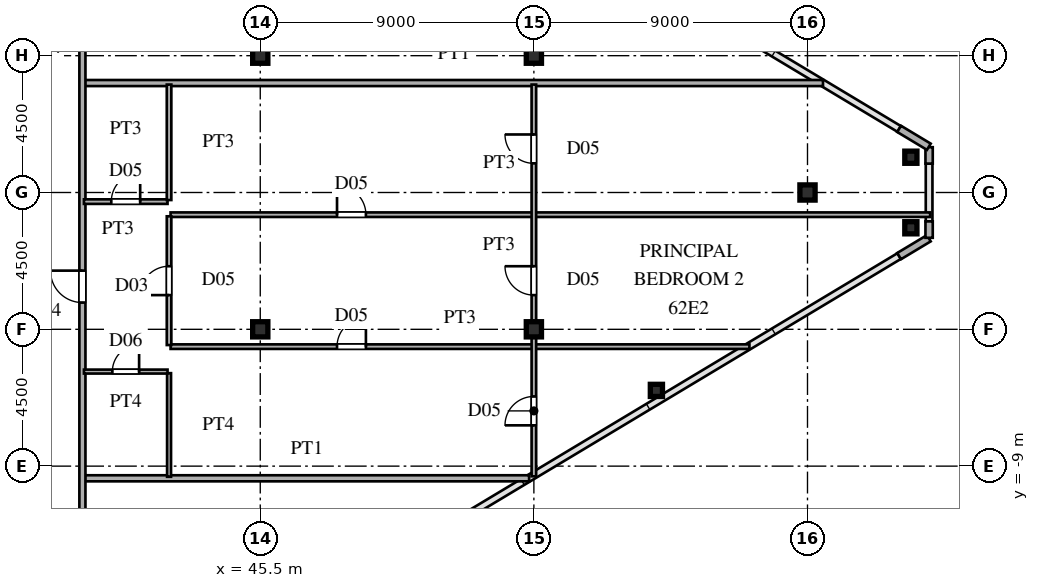
"""IFC4 building model, lengths in metres.
Left out: names, types, materials, properties, quantities, classifications, styles, units other than length and angle.
Written with IfcOpenShell. Run it as: python <this file> out.ifc"""

import sys

from ifc_helpers import new_model, si_unit, direction, frame, frame_2d, origin, origin_2d, place, context, subcontext, project, spatial, rectangle, hollow_rectangle, i_section, extrude, source, transform, mapped, element, fill, save


model = new_model("IFC4")
c1 = context("Model", 3, precision=1e-05, world=origin(), true_north=direction((0.0, 1.0)))
c2 = subcontext(c1, "Body", "Model", "MODEL_VIEW")
j1 = project(units=[si_unit("LENGTHUNIT", "METRE"), si_unit("PLANEANGLEUNIT", "RADIAN")], contexts=[c1])
p1 = place(None, origin())
s1 = spatial("IfcSite", under=j1, at=p1, CompositionType="ELEMENT")
p2 = place(p1, origin())
s2 = spatial("IfcBuilding", under=s1, at=p2, CompositionType="ELEMENT")
p3 = place(p2, frame((0.0, 0.0, 234.6)))
s3 = spatial("IfcBuildingStorey", under=s2, at=p3, CompositionType="ELEMENT", Elevation=234.6)
m1 = source(origin(), c2, "Body", "SweptSolid", [
    extrude(i_section(OverallWidth=0.5, OverallDepth=0.5, WebThickness=0.02, FlangeThickness=0.032, at=origin_2d()), origin(), (0.0, 0.0, 1.0), 4.8),
])
for number, where, z_axis, x_axis in (
    (1, (45.5, -4.5, 0.0), (0.0, 0.0, 1.0), (1.0, 0.0, 0.0)),
    (2, (45.5, 4.5, 0.0), (0.0, 0.0, 1.0), (1.0, 0.0, 0.0)),
    (3, (54.5, -4.5, 0.0), (0.0, 0.0, 1.0), (1.0, 0.0, 0.0)),
    (4, (54.5, 4.5, 0.0), (0.0, 0.0, 1.0), (1.0, 0.0, 0.0)),
    (5, (63.5, 0.0, 0.0), (0.0, 0.0, 1.0), (1.0, 0.0, 0.0)),
):
    element("IfcColumn", number, at=place(p3, frame(where, z_axis=z_axis, x_axis=x_axis)), inside=s3, PredefinedType="COLUMN", context=c2, shape_type="MappedRepresentation", body=[
        mapped(m1, transform((0.0, 0.0, 0.0), scale=1.0)),
    ])
m2 = source(origin(), c2, "Body", "SweptSolid", [
    extrude(hollow_rectangle(XDim=0.4, YDim=0.4, WallThickness=0.016, at=origin_2d()), origin(), (0.0, 0.0, 1.0), 4.8),
])
for number, where, z_axis, x_axis in (
    (6, (66.9, -1.16, 0.0), (0.0, 0.0, 1.0), (1.0, 0.0, 0.0)),
    (7, (66.9, 1.16, 0.0), (0.0, 0.0, 1.0), (1.0, 0.0, 0.0)),
    (8, (58.53, -6.509, 0.0), (0.0, 0.0, 1.0), (1.0, 0.0, 0.0)),
):
    element("IfcColumn", number, at=place(p3, frame(where, z_axis=z_axis, x_axis=x_axis)), inside=s3, PredefinedType="COLUMN", context=c2, shape_type="MappedRepresentation", body=[
        mapped(m2, transform((0.0, 0.0, 0.0), scale=1.0)),
    ])
p4 = place(p3, frame((66.514, -2.092, 0.0), z_axis=(0.0, 0.0, 1.0), x_axis=(0.85743623509, 0.514590228002, 0.0)))
e9 = element("IfcWall", 9, at=p4, inside=s3, PredefinedType="SOLIDWALL", context=c2, shape_type="SweptSolid", body=[
    extrude(rectangle(XDim=1.14, YDim=0.24, at=frame_2d((0.57, 0.0))), origin(), (0.0, 0.0, 1.0), 4.58),
])
for number, where, z_axis, x_axis in (
    (10, (67.5, -1.49, 0.0), (0.0, 0.0, 1.0), (0.0, 1.0, 0.0)),
    (11, (67.5, 0.95, 0.0), (0.0, 0.0, 1.0), (0.0, 1.0, 0.0)),
):
    element("IfcWall", number, at=place(p3, frame(where, z_axis=z_axis, x_axis=x_axis)), inside=s3, PredefinedType="SOLIDWALL", context=c2, shape_type="SweptSolid", body=[
        extrude(rectangle(XDim=0.54, YDim=0.24, at=frame_2d((0.27, 0.0))), origin(), (0.0, 0.0, 1.0), 4.58),
    ])
p5 = place(p3, frame((67.491, 1.505, 0.0), z_axis=(0.0, 0.0, 1.0), x_axis=(-0.85743623509, 0.514590228002, 0.0)))
e12 = element("IfcWall", 12, at=p5, inside=s3, PredefinedType="SOLIDWALL", context=c2, shape_type="SweptSolid", body=[
    extrude(rectangle(XDim=1.14, YDim=0.24, at=frame_2d((0.57, 0.0))), origin(), (0.0, 0.0, 1.0), 4.58),
])
p6 = place(p3, frame((39.73, -9.4, 0.0), z_axis=(0.0, 0.0, 1.0), x_axis=(1.0, 0.0, 0.0)))
e13 = element("IfcWall", 13, at=p6, inside=s3, PredefinedType="PARTITIONING", context=c2, shape_type="SweptSolid", body=[
    extrude(rectangle(XDim=14.613, YDim=0.2, at=frame_2d((7.307, 0.0))), origin(), (0.0, 0.0, 1.0), 4.58),
])
p7 = place(p3, frame((39.7, -5.89, 0.0), z_axis=(0.0, 0.0, 1.0), x_axis=(1.0, 0.0, 0.0)))
e14 = element("IfcWall", 14, at=p7, inside=s3, PredefinedType="PARTITIONING", context=c2, shape_type="SweptSolid", body=[
    extrude(rectangle(XDim=2.75, YDim=0.13, at=frame_2d((1.375, 0.0))), origin(), (0.0, 0.0, 1.0), 4.58),
])
p8 = place(p7, frame((0.935, 0.0, 0.0)))
e15 = element("IfcOpeningElement", 15, at=p8, cuts=e14, PredefinedType="OPENING", context=c2, shape_type="SweptSolid", body=[
    extrude(rectangle(XDim=0.88, YDim=2.1, at=frame_2d((0.44, 1.05))), frame((0.0, 0.075, 0.0), z_axis=(0.0, -1.0, 0.0), x_axis=(1.0, 0.0, 0.0)), (0.0, 0.0, 1.0), 0.15),
])
p9 = place(p3, frame((42.55, -5.07, 0.0), z_axis=(0.0, 0.0, 1.0), x_axis=(1.0, 0.0, 0.0)))
e16 = element("IfcWall", 16, at=p9, inside=s3, PredefinedType="PARTITIONING", context=c2, shape_type="SweptSolid", body=[
    extrude(rectangle(XDim=19.04, YDim=0.15, at=frame_2d((9.52, 0.0))), origin(), (0.0, 0.0, 1.0), 4.58),
])
p10 = place(p9, frame((5.475, 0.0, 0.0)))
e17 = element("IfcOpeningElement", 17, at=p10, cuts=e16, PredefinedType="OPENING", context=c2, shape_type="SweptSolid", body=[
    extrude(rectangle(XDim=0.95, YDim=2.15, at=frame_2d((0.475, 1.075))), frame((0.0, 0.085, 0.0), z_axis=(0.0, -1.0, 0.0), x_axis=(1.0, 0.0, 0.0)), (0.0, 0.0, 1.0), 0.17),
])
p11 = place(p3, frame((42.55, -0.73, 0.0), z_axis=(0.0, 0.0, 1.0), x_axis=(1.0, 0.0, 0.0)))
e18 = element("IfcWall", 18, at=p11, inside=s3, PredefinedType="PARTITIONING", context=c2, shape_type="SweptSolid", body=[
    extrude(rectangle(XDim=24.985, YDim=0.15, at=frame_2d((12.492, 0.0))), origin(), (0.0, 0.0, 1.0), 4.58),
])
p12 = place(p11, frame((5.475, 0.0, 0.0)))
e19 = element("IfcOpeningElement", 19, at=p12, cuts=e18, PredefinedType="OPENING", context=c2, shape_type="SweptSolid", body=[
    extrude(rectangle(XDim=0.95, YDim=2.15, at=frame_2d((0.475, 1.075))), frame((0.0, 0.085, 0.0), z_axis=(0.0, -1.0, 0.0), x_axis=(1.0, 0.0, 0.0)), (0.0, 0.0, 1.0), 0.17),
])
p13 = place(p3, frame((39.7, -0.3, 0.0), z_axis=(0.0, 0.0, 1.0), x_axis=(1.0, 0.0, 0.0)))
e20 = element("IfcWall", 20, at=p13, inside=s3, PredefinedType="PARTITIONING", context=c2, shape_type="SweptSolid", body=[
    extrude(rectangle(XDim=2.75, YDim=0.15, at=frame_2d((1.375, 0.0))), origin(), (0.0, 0.0, 1.0), 4.58),
])
p14 = place(p13, frame((0.9, 0.0, 0.0)))
e21 = element("IfcOpeningElement", 21, at=p14, cuts=e20, PredefinedType="OPENING", context=c2, shape_type="SweptSolid", body=[
    extrude(rectangle(XDim=0.95, YDim=2.15, at=frame_2d((0.475, 1.075))), frame((0.0, 0.085, 0.0), z_axis=(0.0, -1.0, 0.0), x_axis=(1.0, 0.0, 0.0)), (0.0, 0.0, 1.0), 0.17),
])
p15 = place(p3, frame((39.73, 3.6, 0.0), z_axis=(0.0, 0.0, 1.0), x_axis=(1.0, 0.0, 0.0)))
e22 = element("IfcWall", 22, at=p15, inside=s3, PredefinedType="PARTITIONING", context=c2, shape_type="SweptSolid", body=[
    extrude(rectangle(XDim=24.28, YDim=0.2, at=frame_2d((12.14, 0.0))), origin(), (0.0, 0.0, 1.0), 4.58),
])
p16 = place(p3, frame((39.65, -15.515, 0.0), z_axis=(0.0, 0.0, 1.0), x_axis=(0.0, 1.0, 0.0)))
e23 = element("IfcWall", 23, at=p16, inside=s3, PredefinedType="PARTITIONING", context=c2, shape_type="SweptSolid", body=[
    extrude(rectangle(XDim=31.03, YDim=0.2, at=frame_2d((15.515, 0.0))), origin(), (0.0, 0.0, 1.0), 4.58),
])
p17 = place(p16, frame((2.49, 0.0, 0.0)))
e24 = element("IfcOpeningElement", 24, at=p17, cuts=e23, PredefinedType="OPENING", context=c2, shape_type="SweptSolid", body=[
    extrude(rectangle(XDim=1.05, YDim=2.25, at=frame_2d((0.525, 1.125))), frame((0.0, 0.11, 0.0), z_axis=(0.0, -1.0, 0.0), x_axis=(1.0, 0.0, 0.0)), (0.0, 0.0, 1.0), 0.22),
])
p18 = place(p16, frame((11.895, 0.0, 0.0)))
e25 = element("IfcOpeningElement", 25, at=p18, cuts=e23, PredefinedType="OPENING", context=c2, shape_type="SweptSolid", body=[
    extrude(rectangle(XDim=1.05, YDim=2.25, at=frame_2d((0.525, 1.125))), frame((0.0, 0.11, 0.0), z_axis=(0.0, -1.0, 0.0), x_axis=(1.0, 0.0, 0.0)), (0.0, 0.0, 1.0), 0.22),
])
p19 = place(p16, frame((24.59, 0.0, 0.0)))
e26 = element("IfcOpeningElement", 26, at=p19, cuts=e23, PredefinedType="OPENING", context=c2, shape_type="SweptSolid", body=[
    extrude(rectangle(XDim=1.05, YDim=2.25, at=frame_2d((0.525, 1.125))), frame((0.0, 0.11, 0.0), z_axis=(0.0, -1.0, 0.0), x_axis=(1.0, 0.0, 0.0)), (0.0, 0.0, 1.0), 0.22),
])
p20 = place(p3, frame((42.5, -9.35, 0.0), z_axis=(0.0, 0.0, 1.0), x_axis=(0.0, 1.0, 0.0)))
e27 = element("IfcWall", 27, at=p20, inside=s3, PredefinedType="PARTITIONING", context=c2, shape_type="SweptSolid", body=[
    extrude(rectangle(XDim=3.408, YDim=0.13, at=frame_2d((1.704, 0.0))), origin(), (0.0, 0.0, 1.0), 4.58),
])
p21 = place(p3, frame((42.5, -5.017, 0.0), z_axis=(0.0, 0.0, 1.0), x_axis=(0.0, 1.0, 0.0)))
e28 = element("IfcWall", 28, at=p21, inside=s3, PredefinedType="PARTITIONING", context=c2, shape_type="SweptSolid", body=[
    extrude(rectangle(XDim=4.234, YDim=0.15, at=frame_2d((2.117, 0.0))), origin(), (0.0, 0.0, 1.0), 4.58),
])
p22 = place(p21, frame((1.642, 0.0, 0.0)))
e29 = element("IfcOpeningElement", 29, at=p22, cuts=e28, PredefinedType="OPENING", context=c2, shape_type="SweptSolid", body=[
    extrude(rectangle(XDim=0.95, YDim=2.15, at=frame_2d((0.475, 1.075))), frame((0.0, 0.085, 0.0), z_axis=(0.0, -1.0, 0.0), x_axis=(1.0, 0.0, 0.0)), (0.0, 0.0, 1.0), 0.17),
])
p23 = place(p3, frame((42.5, -0.248, 0.0), z_axis=(0.0, 0.0, 1.0), x_axis=(0.0, 1.0, 0.0)))
e30 = element("IfcWall", 30, at=p23, inside=s3, PredefinedType="PARTITIONING", context=c2, shape_type="SweptSolid", body=[
    extrude(rectangle(XDim=3.798, YDim=0.15, at=frame_2d((1.899, 0.0))), origin(), (0.0, 0.0, 1.0), 4.58),
])
p24 = place(p3, frame((54.5, -9.335, 0.0), z_axis=(0.0, 0.0, 1.0), x_axis=(0.0, 1.0, 0.0)))
e31 = element("IfcWall", 31, at=p24, inside=s3, PredefinedType="PARTITIONING", context=c2, shape_type="SweptSolid", body=[
    extrude(rectangle(XDim=12.885, YDim=0.15, at=frame_2d((6.442, 0.0))), origin(), (0.0, 0.0, 1.0), 3.98),
])
p25 = place(p24, frame((5.96, 0.0, 0.0)))
e32 = element("IfcOpeningElement", 32, at=p25, cuts=e31, PredefinedType="OPENING", context=c2, shape_type="SweptSolid", body=[
    extrude(rectangle(XDim=0.95, YDim=2.15, at=frame_2d((0.475, 1.075))), frame((0.0, 0.085, 0.0), z_axis=(0.0, -1.0, 0.0), x_axis=(1.0, 0.0, 0.0)), (0.0, 0.0, 1.0), 0.17),
])
p26 = place(p24, frame((1.677, 0.0, 0.0)))
e33 = element("IfcOpeningElement", 33, at=p26, cuts=e31, PredefinedType="OPENING", context=c2, shape_type="SweptSolid", body=[
    extrude(rectangle(XDim=0.95, YDim=2.15, at=frame_2d((0.475, 1.075))), frame((0.0, 0.085, 0.0), z_axis=(0.0, -1.0, 0.0), x_axis=(1.0, 0.0, 0.0)), (0.0, 0.0, 1.0), 0.17),
])
p27 = place(p24, frame((10.293, 0.0, 0.0)))
e34 = element("IfcOpeningElement", 34, at=p27, cuts=e31, PredefinedType="OPENING", context=c2, shape_type="SweptSolid", body=[
    extrude(rectangle(XDim=0.95, YDim=2.15, at=frame_2d((0.475, 1.075))), frame((0.0, 0.085, 0.0), z_axis=(0.0, -1.0, 0.0), x_axis=(1.0, 0.0, 0.0)), (0.0, 0.0, 1.0), 0.17),
])
m3 = source(origin(), c2, "Body", "SweptSolid", [
    extrude(rectangle(XDim=0.88, YDim=2.1, at=frame_2d((0.44, 1.05))), frame((0.0, 0.025, 0.0), z_axis=(0.0, -1.0, 0.0), x_axis=(1.0, 0.0, 0.0)), (0.0, 0.0, 1.0), 0.05),
])
p28 = place(p8, origin())
e35 = element("IfcDoor", 35, at=p28, inside=s3, OperationType="SINGLE_SWING_RIGHT", PredefinedType="DOOR", context=c2, shape_type="MappedRepresentation", body=[
    mapped(m3, transform((0.0, 0.0, 0.0), scale=1.0)),
])
fill(e15, e35)
m4 = source(origin(), c2, "Body", "SweptSolid", [
    extrude(rectangle(XDim=0.95, YDim=2.15, at=frame_2d((0.475, 1.075))), frame((0.0, 0.025, 0.0), z_axis=(0.0, -1.0, 0.0), x_axis=(1.0, 0.0, 0.0)), (0.0, 0.0, 1.0), 0.05),
])
p29 = place(p10, origin())
e36 = element("IfcDoor", 36, at=p29, inside=s3, OperationType="SINGLE_SWING_RIGHT", PredefinedType="DOOR", context=c2, shape_type="MappedRepresentation", body=[
    mapped(m4, transform((0.0, 0.0, 0.0), scale=1.0)),
])
fill(e17, e36)
p30 = place(p12, origin())
e37 = element("IfcDoor", 37, at=p30, inside=s3, OperationType="SINGLE_SWING_LEFT", PredefinedType="DOOR", context=c2, shape_type="MappedRepresentation", body=[
    mapped(m4, transform((0.0, 0.0, 0.0), scale=1.0)),
])
fill(e19, e37)
p31 = place(p14, origin())
e38 = element("IfcDoor", 38, at=p31, inside=s3, OperationType="SINGLE_SWING_RIGHT", PredefinedType="DOOR", context=c2, shape_type="MappedRepresentation", body=[
    mapped(m4, transform((0.0, 0.0, 0.0), scale=1.0)),
])
fill(e21, e38)
m5 = source(origin(), c2, "Body", "SweptSolid", [
    extrude(rectangle(XDim=1.05, YDim=2.25, at=frame_2d((0.525, 1.125))), frame((0.0, 0.025, 0.0), z_axis=(0.0, -1.0, 0.0), x_axis=(1.0, 0.0, 0.0)), (0.0, 0.0, 1.0), 0.05),
])
p32 = place(p18, origin())
e39 = element("IfcDoor", 39, at=p32, inside=s3, OperationType="SINGLE_SWING_RIGHT", PredefinedType="DOOR", context=c2, shape_type="MappedRepresentation", body=[
    mapped(m5, transform((0.0, 0.0, 0.0), scale=1.0)),
])
fill(e25, e39)
p33 = place(p22, origin())
e40 = element("IfcDoor", 40, at=p33, inside=s3, OperationType="SINGLE_SWING_LEFT", PredefinedType="DOOR", context=c2, shape_type="MappedRepresentation", body=[
    mapped(m4, transform((0.0, 0.0, 0.0), scale=1.0)),
])
fill(e29, e40)
p34 = place(p25, origin())
e41 = element("IfcDoor", 41, at=p34, inside=s3, OperationType="SINGLE_SWING_RIGHT", PredefinedType="DOOR", context=c2, shape_type="MappedRepresentation", body=[
    mapped(m4, transform((0.0, 0.0, 0.0), scale=1.0)),
])
fill(e32, e41)
p35 = place(p26, origin())
e42 = element("IfcDoor", 42, at=p35, inside=s3, OperationType="SINGLE_SWING_LEFT", PredefinedType="DOOR", context=c2, shape_type="MappedRepresentation", body=[
    mapped(m4, transform((0.0, 0.0, 0.0), scale=1.0)),
])
fill(e33, e42)
p36 = place(p27, origin())
e43 = element("IfcDoor", 43, at=p36, inside=s3, OperationType="SINGLE_SWING_RIGHT", PredefinedType="DOOR", context=c2, shape_type="MappedRepresentation", body=[
    mapped(m4, transform((0.0, 0.0, 0.0), scale=1.0)),
])
fill(e34, e43)
save(model, sys.argv[1])
